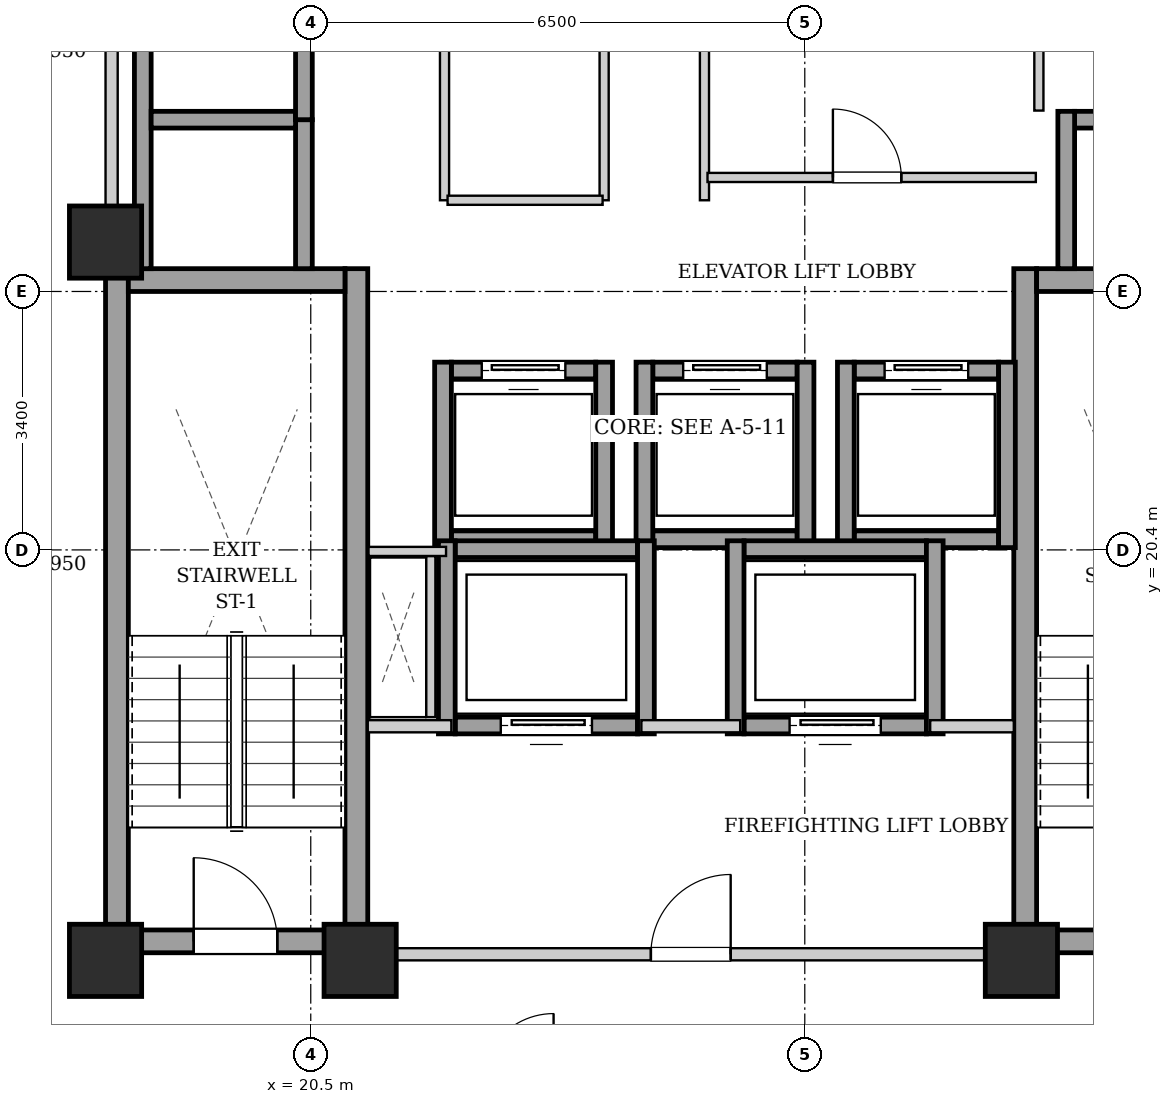
"""IFC4 building model, lengths in metres.
Left out: names, types, materials, properties, quantities, classifications, styles, units other than length and angle.
Written with IfcOpenShell. Run it as: python <this file> out.ifc"""

import sys

from ifc_helpers import new_model, si_unit, direction, frame, frame_2d, origin, origin_2d, place, context, subcontext, project, spatial, rectangle, extrude, element, fill, save


model = new_model("IFC4")
c1 = context("Model", 3, precision=1e-05, world=origin(), true_north=direction((0.0, 1.0)))
c2 = subcontext(c1, "Body", "Model", "MODEL_VIEW")
j1 = project(units=[si_unit("LENGTHUNIT", "METRE"), si_unit("PLANEANGLEUNIT", "RADIAN")], contexts=[c1])
p1 = place(None, origin())
s1 = spatial("IfcSite", under=j1, at=p1, CompositionType="ELEMENT")
p2 = place(p1, origin())
s2 = spatial("IfcBuilding", under=s1, at=p2, CompositionType="ELEMENT")
p3 = place(p2, frame((0.0, 0.0, 163.4)))
s3 = spatial("IfcBuildingStorey", under=s2, at=p3, CompositionType="ELEMENT", Elevation=163.4)
for number, where, z_axis, x_axis in (
    (1, (17.8, 15.0, 0.0), (0.0, 0.0, 1.0), (1.0, 0.0, 0.0)),
    (2, (21.15, 15.0, 0.0), (0.0, 0.0, 1.0), (1.0, 0.0, 0.0)),
    (3, (29.85, 15.0, 0.0), (0.0, 0.0, 1.0), (1.0, 0.0, 0.0)),
    (4, (17.8, 24.45, 0.0), (0.0, 0.0, 1.0), (1.0, 0.0, 0.0)),
):
    element("IfcColumn", number, at=place(p3, frame(where, z_axis=z_axis, x_axis=x_axis)), inside=s3, PredefinedType="COLUMN", context=c2, shape_type="SweptSolid", body=[
        extrude(rectangle(XDim=0.95, YDim=0.95, at=origin_2d()), origin(), (0.0, 0.0, 1.0), 3.25),
    ])
for number, where, z_axis, x_axis in (
    (5, (17.95, 15.1, 0.0), (0.0, 0.0, 1.0), (0.0, 1.0, 0.0)),
    (6, (21.1, 15.1, 0.0), (0.0, 0.0, 1.0), (0.0, 1.0, 0.0)),
):
    element("IfcWall", number, at=place(p3, frame(where, z_axis=z_axis, x_axis=x_axis)), inside=s3, PredefinedType="SHEAR", context=c2, shape_type="SweptSolid", body=[
        extrude(rectangle(XDim=9.0, YDim=0.3, at=frame_2d((4.5, 0.0))), origin(), (0.0, 0.0, 1.0), 2.99),
    ])
p4 = place(p3, frame((18.1, 23.95, 0.0), z_axis=(0.0, 0.0, 1.0), x_axis=(1.0, 0.0, 0.0)))
e7 = element("IfcWall", 7, at=p4, inside=s3, PredefinedType="SHEAR", context=c2, shape_type="SweptSolid", body=[
    extrude(rectangle(XDim=2.85, YDim=0.3, at=frame_2d((1.425, 0.0))), origin(), (0.0, 0.0, 1.0), 2.99),
])
p5 = place(p3, frame((18.1, 15.25, 0.0), z_axis=(0.0, 0.0, 1.0), x_axis=(1.0, 0.0, 0.0)))
e8 = element("IfcWall", 8, at=p5, inside=s3, PredefinedType="SHEAR", context=c2, shape_type="SweptSolid", body=[
    extrude(rectangle(XDim=2.85, YDim=0.3, at=frame_2d((1.425, 0.0))), origin(), (0.0, 0.0, 1.0), 2.99),
])
p6 = place(p5, frame((0.86, 0.0, 0.0)))
e9 = element("IfcOpeningElement", 9, at=p6, cuts=e8, PredefinedType="OPENING", context=c2, shape_type="SweptSolid", body=[
    extrude(rectangle(XDim=1.1, YDim=2.05, at=frame_2d((0.55, 1.025))), frame((0.0, 0.16, 0.0), z_axis=(0.0, -1.0, 0.0), x_axis=(1.0, 0.0, 0.0)), (0.0, 0.0, 1.0), 0.32),
])
p7 = place(p3, frame((29.9, 15.1, 0.0), z_axis=(0.0, 0.0, 1.0), x_axis=(0.0, 1.0, 0.0)))
e10 = element("IfcWall", 10, at=p7, inside=s3, PredefinedType="SHEAR", context=c2, shape_type="SweptSolid", body=[
    extrude(rectangle(XDim=9.0, YDim=0.3, at=frame_2d((4.5, 0.0))), origin(), (0.0, 0.0, 1.0), 2.99),
])
p8 = place(p3, frame((30.05, 23.95, 0.0), z_axis=(0.0, 0.0, 1.0), x_axis=(1.0, 0.0, 0.0)))
e11 = element("IfcWall", 11, at=p8, inside=s3, PredefinedType="SHEAR", context=c2, shape_type="SweptSolid", body=[
    extrude(rectangle(XDim=2.85, YDim=0.3, at=frame_2d((1.425, 0.0))), origin(), (0.0, 0.0, 1.0), 2.99),
])
p9 = place(p3, frame((30.05, 15.25, 0.0), z_axis=(0.0, 0.0, 1.0), x_axis=(1.0, 0.0, 0.0)))
e12 = element("IfcWall", 12, at=p9, inside=s3, PredefinedType="SHEAR", context=c2, shape_type="SweptSolid", body=[
    extrude(rectangle(XDim=2.85, YDim=0.3, at=frame_2d((1.425, 0.0))), origin(), (0.0, 0.0, 1.0), 2.99),
])
p10 = place(p9, frame((0.86, 0.0, 0.0)))
e13 = element("IfcOpeningElement", 13, at=p10, cuts=e12, PredefinedType="OPENING", context=c2, shape_type="SweptSolid", body=[
    extrude(rectangle(XDim=1.1, YDim=2.05, at=frame_2d((0.55, 1.025))), frame((0.0, 0.16, 0.0), z_axis=(0.0, -1.0, 0.0), x_axis=(1.0, 0.0, 0.0)), (0.0, 0.0, 1.0), 0.32),
])
p11 = place(p3, frame((22.35, 20.54, 0.0), z_axis=(0.0, 0.0, 1.0), x_axis=(1.0, 0.0, 0.0)))
e14 = element("IfcWall", 14, at=p11, inside=s3, PredefinedType="SHEAR", context=c2, shape_type="SweptSolid", body=[
    extrude(rectangle(XDim=1.9, YDim=0.22, at=frame_2d((0.95, 0.0))), origin(), (0.0, 0.0, 1.0), 2.99),
])
p12 = place(p3, frame((22.35, 22.76, 0.0), z_axis=(0.0, 0.0, 1.0), x_axis=(1.0, 0.0, 0.0)))
e15 = element("IfcWall", 15, at=p12, inside=s3, PredefinedType="SHEAR", context=c2, shape_type="SweptSolid", body=[
    extrude(rectangle(XDim=1.9, YDim=0.22, at=frame_2d((0.95, 0.0))), origin(), (0.0, 0.0, 1.0), 2.99),
])
p13 = place(p12, frame((0.4, 0.0, 0.0)))
e16 = element("IfcOpeningElement", 16, at=p13, cuts=e15, PredefinedType="OPENING", context=c2, shape_type="SweptSolid", body=[
    extrude(rectangle(XDim=1.1, YDim=2.15, at=frame_2d((0.55, 1.075))), frame((0.0, 0.12, 0.0), z_axis=(0.0, -1.0, 0.0), x_axis=(1.0, 0.0, 0.0)), (0.0, 0.0, 1.0), 0.24),
])
for number, where, z_axis, x_axis in (
    (17, (22.24, 20.43, 0.0), (0.0, 0.0, 1.0), (0.0, 1.0, 0.0)),
    (18, (24.36, 20.43, 0.0), (0.0, 0.0, 1.0), (0.0, 1.0, 0.0)),
):
    element("IfcWall", number, at=place(p3, frame(where, z_axis=z_axis, x_axis=x_axis)), inside=s3, PredefinedType="SHEAR", context=c2, shape_type="SweptSolid", body=[
        extrude(rectangle(XDim=2.44, YDim=0.22, at=frame_2d((1.22, 0.0))), origin(), (0.0, 0.0, 1.0), 2.99),
    ])
p14 = place(p3, frame((25.0, 20.54, 0.0), z_axis=(0.0, 0.0, 1.0), x_axis=(1.0, 0.0, 0.0)))
e19 = element("IfcWall", 19, at=p14, inside=s3, PredefinedType="SHEAR", context=c2, shape_type="SweptSolid", body=[
    extrude(rectangle(XDim=1.9, YDim=0.22, at=frame_2d((0.95, 0.0))), origin(), (0.0, 0.0, 1.0), 2.99),
])
p15 = place(p3, frame((25.0, 22.76, 0.0), z_axis=(0.0, 0.0, 1.0), x_axis=(1.0, 0.0, 0.0)))
e20 = element("IfcWall", 20, at=p15, inside=s3, PredefinedType="SHEAR", context=c2, shape_type="SweptSolid", body=[
    extrude(rectangle(XDim=1.9, YDim=0.22, at=frame_2d((0.95, 0.0))), origin(), (0.0, 0.0, 1.0), 2.99),
])
p16 = place(p15, frame((0.4, 0.0, 0.0)))
e21 = element("IfcOpeningElement", 21, at=p16, cuts=e20, PredefinedType="OPENING", context=c2, shape_type="SweptSolid", body=[
    extrude(rectangle(XDim=1.1, YDim=2.15, at=frame_2d((0.55, 1.075))), frame((0.0, 0.12, 0.0), z_axis=(0.0, -1.0, 0.0), x_axis=(1.0, 0.0, 0.0)), (0.0, 0.0, 1.0), 0.24),
])
for number, where, z_axis, x_axis in (
    (22, (24.89, 20.43, 0.0), (0.0, 0.0, 1.0), (0.0, 1.0, 0.0)),
    (23, (27.01, 20.43, 0.0), (0.0, 0.0, 1.0), (0.0, 1.0, 0.0)),
):
    element("IfcWall", number, at=place(p3, frame(where, z_axis=z_axis, x_axis=x_axis)), inside=s3, PredefinedType="SHEAR", context=c2, shape_type="SweptSolid", body=[
        extrude(rectangle(XDim=2.44, YDim=0.22, at=frame_2d((1.22, 0.0))), origin(), (0.0, 0.0, 1.0), 2.99),
    ])
p17 = place(p3, frame((27.65, 20.54, 0.0), z_axis=(0.0, 0.0, 1.0), x_axis=(1.0, 0.0, 0.0)))
e24 = element("IfcWall", 24, at=p17, inside=s3, PredefinedType="SHEAR", context=c2, shape_type="SweptSolid", body=[
    extrude(rectangle(XDim=1.9, YDim=0.22, at=frame_2d((0.95, 0.0))), origin(), (0.0, 0.0, 1.0), 2.99),
])
p18 = place(p3, frame((27.65, 22.76, 0.0), z_axis=(0.0, 0.0, 1.0), x_axis=(1.0, 0.0, 0.0)))
e25 = element("IfcWall", 25, at=p18, inside=s3, PredefinedType="SHEAR", context=c2, shape_type="SweptSolid", body=[
    extrude(rectangle(XDim=1.9, YDim=0.22, at=frame_2d((0.95, 0.0))), origin(), (0.0, 0.0, 1.0), 2.99),
])
p19 = place(p18, frame((0.4, 0.0, 0.0)))
e26 = element("IfcOpeningElement", 26, at=p19, cuts=e25, PredefinedType="OPENING", context=c2, shape_type="SweptSolid", body=[
    extrude(rectangle(XDim=1.1, YDim=2.15, at=frame_2d((0.55, 1.075))), frame((0.0, 0.12, 0.0), z_axis=(0.0, -1.0, 0.0), x_axis=(1.0, 0.0, 0.0)), (0.0, 0.0, 1.0), 0.24),
])
for number, where, z_axis, x_axis in (
    (27, (27.54, 20.43, 0.0), (0.0, 0.0, 1.0), (0.0, 1.0, 0.0)),
    (28, (29.66, 20.43, 0.0), (0.0, 0.0, 1.0), (0.0, 1.0, 0.0)),
):
    element("IfcWall", number, at=place(p3, frame(where, z_axis=z_axis, x_axis=x_axis)), inside=s3, PredefinedType="SHEAR", context=c2, shape_type="SweptSolid", body=[
        extrude(rectangle(XDim=2.44, YDim=0.22, at=frame_2d((1.22, 0.0))), origin(), (0.0, 0.0, 1.0), 2.99),
    ])
p20 = place(p3, frame((18.29, 24.1, 0.0), z_axis=(0.0, 0.0, 1.0), x_axis=(0.0, 1.0, 0.0)))
e29 = element("IfcWall", 29, at=p20, inside=s3, PredefinedType="SHEAR", context=c2, shape_type="SweptSolid", body=[
    extrude(rectangle(XDim=4.14, YDim=0.22, at=frame_2d((2.07, 0.0))), origin(), (0.0, 0.0, 1.0), 2.99),
])
p21 = place(p3, frame((20.41, 24.1, 0.0), z_axis=(0.0, 0.0, 1.0), x_axis=(0.0, 1.0, 0.0)))
e30 = element("IfcWall", 30, at=p21, inside=s3, PredefinedType="SHEAR", context=c2, shape_type="SweptSolid", body=[
    extrude(rectangle(XDim=1.96, YDim=0.22, at=frame_2d((0.98, 0.0))), origin(), (0.0, 0.0, 1.0), 2.99),
])
p22 = place(p3, frame((18.4, 26.06, 0.0), z_axis=(0.0, 0.0, 1.0), x_axis=(1.0, 0.0, 0.0)))
e31 = element("IfcWall", 31, at=p22, inside=s3, PredefinedType="SHEAR", context=c2, shape_type="SweptSolid", body=[
    extrude(rectangle(XDim=1.9, YDim=0.22, at=frame_2d((0.95, 0.0))), origin(), (0.0, 0.0, 1.0), 2.99),
])
p23 = place(p3, frame((20.41, 26.06, 0.0), z_axis=(0.0, 0.0, 1.0), x_axis=(0.0, 1.0, 0.0)))
e32 = element("IfcWall", 32, at=p23, inside=s3, PredefinedType="SHEAR", context=c2, shape_type="SweptSolid", body=[
    extrude(rectangle(XDim=2.18, YDim=0.22, at=frame_2d((1.09, 0.0))), origin(), (0.0, 0.0, 1.0), 2.99),
])
p24 = place(p3, frame((30.55, 26.06, 0.0), z_axis=(0.0, 0.0, 1.0), x_axis=(1.0, 0.0, 0.0)))
e33 = element("IfcWall", 33, at=p24, inside=s3, PredefinedType="SHEAR", context=c2, shape_type="SweptSolid", body=[
    extrude(rectangle(XDim=1.9, YDim=0.22, at=frame_2d((0.95, 0.0))), origin(), (0.0, 0.0, 1.0), 2.99),
])
p25 = place(p3, frame((30.44, 24.1, 0.0), z_axis=(0.0, 0.0, 1.0), x_axis=(0.0, 1.0, 0.0)))
e34 = element("IfcWall", 34, at=p25, inside=s3, PredefinedType="SHEAR", context=c2, shape_type="SweptSolid", body=[
    extrude(rectangle(XDim=2.07, YDim=0.22, at=frame_2d((1.035, 0.0))), origin(), (0.0, 0.0, 1.0), 2.99),
])
p26 = place(p3, frame((22.4, 18.09, 0.0), z_axis=(0.0, 0.0, 1.0), x_axis=(1.0, 0.0, 0.0)))
e35 = element("IfcWall", 35, at=p26, inside=s3, PredefinedType="SHEAR", context=c2, shape_type="SweptSolid", body=[
    extrude(rectangle(XDim=2.4, YDim=0.22, at=frame_2d((1.2, 0.0))), origin(), (0.0, 0.0, 1.0), 2.99),
])
p27 = place(p26, frame((0.6, 0.0, 0.0)))
e36 = element("IfcOpeningElement", 36, at=p27, cuts=e35, PredefinedType="OPENING", context=c2, shape_type="SweptSolid", body=[
    extrude(rectangle(XDim=1.2, YDim=2.15, at=frame_2d((0.6, 1.075))), frame((0.0, 0.12, 0.0), z_axis=(0.0, -1.0, 0.0), x_axis=(1.0, 0.0, 0.0)), (0.0, 0.0, 1.0), 0.24),
])
p28 = place(p3, frame((22.4, 20.41, 0.0), z_axis=(0.0, 0.0, 1.0), x_axis=(1.0, 0.0, 0.0)))
e37 = element("IfcWall", 37, at=p28, inside=s3, PredefinedType="SHEAR", context=c2, shape_type="SweptSolid", body=[
    extrude(rectangle(XDim=2.4, YDim=0.22, at=frame_2d((1.2, 0.0))), origin(), (0.0, 0.0, 1.0), 2.99),
])
for number, where, z_axis, x_axis in (
    (38, (22.29, 17.98, 0.0), (0.0, 0.0, 1.0), (0.0, 1.0, 0.0)),
    (39, (24.91, 17.98, 0.0), (0.0, 0.0, 1.0), (0.0, 1.0, 0.0)),
):
    element("IfcWall", number, at=place(p3, frame(where, z_axis=z_axis, x_axis=x_axis)), inside=s3, PredefinedType="SHEAR", context=c2, shape_type="SweptSolid", body=[
        extrude(rectangle(XDim=2.54, YDim=0.22, at=frame_2d((1.27, 0.0))), origin(), (0.0, 0.0, 1.0), 2.99),
    ])
p29 = place(p3, frame((26.2, 18.09, 0.0), z_axis=(0.0, 0.0, 1.0), x_axis=(1.0, 0.0, 0.0)))
e40 = element("IfcWall", 40, at=p29, inside=s3, PredefinedType="SHEAR", context=c2, shape_type="SweptSolid", body=[
    extrude(rectangle(XDim=2.4, YDim=0.22, at=frame_2d((1.2, 0.0))), origin(), (0.0, 0.0, 1.0), 2.99),
])
p30 = place(p29, frame((0.6, 0.0, 0.0)))
e41 = element("IfcOpeningElement", 41, at=p30, cuts=e40, PredefinedType="OPENING", context=c2, shape_type="SweptSolid", body=[
    extrude(rectangle(XDim=1.2, YDim=2.15, at=frame_2d((0.6, 1.075))), frame((0.0, 0.12, 0.0), z_axis=(0.0, -1.0, 0.0), x_axis=(1.0, 0.0, 0.0)), (0.0, 0.0, 1.0), 0.24),
])
p31 = place(p3, frame((26.2, 20.41, 0.0), z_axis=(0.0, 0.0, 1.0), x_axis=(1.0, 0.0, 0.0)))
e42 = element("IfcWall", 42, at=p31, inside=s3, PredefinedType="SHEAR", context=c2, shape_type="SweptSolid", body=[
    extrude(rectangle(XDim=2.4, YDim=0.22, at=frame_2d((1.2, 0.0))), origin(), (0.0, 0.0, 1.0), 2.99),
])
for number, where, z_axis, x_axis in (
    (43, (26.09, 17.98, 0.0), (0.0, 0.0, 1.0), (0.0, 1.0, 0.0)),
    (44, (28.71, 17.98, 0.0), (0.0, 0.0, 1.0), (0.0, 1.0, 0.0)),
):
    element("IfcWall", number, at=place(p3, frame(where, z_axis=z_axis, x_axis=x_axis)), inside=s3, PredefinedType="SHEAR", context=c2, shape_type="SweptSolid", body=[
        extrude(rectangle(XDim=2.54, YDim=0.22, at=frame_2d((1.27, 0.0))), origin(), (0.0, 0.0, 1.0), 2.99),
    ])
p32 = place(p3, frame((21.25, 15.08, 0.0), z_axis=(0.0, 0.0, 1.0), x_axis=(1.0, 0.0, 0.0)))
e45 = element("IfcWall", 45, at=p32, inside=s3, PredefinedType="PARTITIONING", context=c2, shape_type="SweptSolid", body=[
    extrude(rectangle(XDim=8.5, YDim=0.16, at=frame_2d((4.25, 0.0))), origin(), (0.0, 0.0, 1.0), 2.442),
])
p33 = place(p32, frame((3.725, 0.0, 0.0)))
e46 = element("IfcOpeningElement", 46, at=p33, cuts=e45, PredefinedType="OPENING", context=c2, shape_type="SweptSolid", body=[
    extrude(rectangle(XDim=1.05, YDim=2.05, at=frame_2d((0.525, 1.025))), frame((0.0, 0.09, 0.0), z_axis=(0.0, -1.0, 0.0), x_axis=(1.0, 0.0, 0.0)), (0.0, 0.0, 1.0), 0.18),
])
p34 = place(p3, frame((21.25, 18.08, 0.0), z_axis=(0.0, 0.0, 1.0), x_axis=(1.0, 0.0, 0.0)))
e47 = element("IfcWall", 47, at=p34, inside=s3, PredefinedType="PARTITIONING", context=c2, shape_type="SweptSolid", body=[
    extrude(rectangle(XDim=1.1, YDim=0.16, at=frame_2d((0.55, 0.0))), origin(), (0.0, 0.0, 1.0), 2.99),
])
p35 = place(p3, frame((24.85, 18.08, 0.0), z_axis=(0.0, 0.0, 1.0), x_axis=(1.0, 0.0, 0.0)))
e48 = element("IfcWall", 48, at=p35, inside=s3, PredefinedType="PARTITIONING", context=c2, shape_type="SweptSolid", body=[
    extrude(rectangle(XDim=1.3, YDim=0.16, at=frame_2d((0.65, 0.0))), origin(), (0.0, 0.0, 1.0), 2.99),
])
p36 = place(p3, frame((28.65, 18.08, 0.0), z_axis=(0.0, 0.0, 1.0), x_axis=(1.0, 0.0, 0.0)))
e49 = element("IfcWall", 49, at=p36, inside=s3, PredefinedType="PARTITIONING", context=c2, shape_type="SweptSolid", body=[
    extrude(rectangle(XDim=1.1, YDim=0.16, at=frame_2d((0.55, 0.0))), origin(), (0.0, 0.0, 1.0), 2.99),
])
p37 = place(p3, frame((17.88, 24.12, 0.0), z_axis=(0.0, 0.0, 1.0), x_axis=(0.0, 1.0, 0.0)))
e50 = element("IfcWall", 50, at=p37, inside=s3, PredefinedType="PARTITIONING", context=c2, shape_type="SweptSolid", body=[
    extrude(rectangle(XDim=4.76, YDim=0.16, at=frame_2d((2.38, 0.0))), origin(), (0.0, 0.0, 1.0), 2.99),
])
p38 = place(p3, frame((22.08, 18.2, 0.0), z_axis=(0.0, 0.0, 1.0), x_axis=(0.0, 1.0, 0.0)))
e51 = element("IfcWall", 51, at=p38, inside=s3, PredefinedType="PARTITIONING", context=c2, shape_type="SweptSolid", body=[
    extrude(rectangle(XDim=2.12, YDim=0.12, at=frame_2d((1.06, 0.0))), origin(), (0.0, 0.0, 1.0), 2.99),
])
p39 = place(p3, frame((22.28, 20.38, 0.0), z_axis=(0.0, 0.0, 1.0), x_axis=(-1.0, 0.0, 0.0)))
e52 = element("IfcWall", 52, at=p39, inside=s3, PredefinedType="PARTITIONING", context=c2, shape_type="SweptSolid", body=[
    extrude(rectangle(XDim=1.02, YDim=0.12, at=frame_2d((0.51, 0.0))), origin(), (0.0, 0.0, 1.0), 2.99),
])
for number, where, z_axis, x_axis in (
    (53, (24.36, 25.0, 0.0), (0.0, 0.0, 1.0), (0.0, 1.0, 0.0)),
    (54, (25.68, 25.0, 0.0), (0.0, 0.0, 1.0), (0.0, 1.0, 0.0)),
):
    element("IfcWall", number, at=place(p3, frame(where, z_axis=z_axis, x_axis=x_axis)), inside=s3, PredefinedType="PARTITIONING", context=c2, shape_type="SweptSolid", body=[
        extrude(rectangle(XDim=3.87, YDim=0.12, at=frame_2d((1.935, 0.0))), origin(), (0.0, 0.0, 1.0), 2.99),
    ])
p40 = place(p3, frame((30.08, 26.18, 0.0), z_axis=(0.0, 0.0, 1.0), x_axis=(0.0, 1.0, 0.0)))
e55 = element("IfcWall", 55, at=p40, inside=s3, PredefinedType="PARTITIONING", context=c2, shape_type="SweptSolid", body=[
    extrude(rectangle(XDim=2.68, YDim=0.12, at=frame_2d((1.34, 0.0))), origin(), (0.0, 0.0, 1.0), 2.99),
])
p41 = place(p3, frame((22.26, 25.0, 0.0), z_axis=(0.0, 0.0, 1.0), x_axis=(0.0, 1.0, 0.0)))
e56 = element("IfcWall", 56, at=p41, inside=s3, PredefinedType="PARTITIONING", context=c2, shape_type="SweptSolid", body=[
    extrude(rectangle(XDim=3.86, YDim=0.12, at=frame_2d((1.93, 0.0))), origin(), (0.0, 0.0, 1.0), 2.99),
])
p42 = place(p3, frame((22.3, 25.0, 0.0), z_axis=(0.0, 0.0, 1.0), x_axis=(1.0, 0.0, 0.0)))
e57 = element("IfcWall", 57, at=p42, inside=s3, PredefinedType="PARTITIONING", context=c2, shape_type="SweptSolid", body=[
    extrude(rectangle(XDim=2.04, YDim=0.12, at=frame_2d((1.02, 0.0))), origin(), (0.0, 0.0, 1.0), 2.99),
])
p43 = place(p3, frame((25.72, 25.3, 0.0), z_axis=(0.0, 0.0, 1.0), x_axis=(1.0, 0.0, 0.0)))
e58 = element("IfcWall", 58, at=p43, inside=s3, PredefinedType="PARTITIONING", context=c2, shape_type="SweptSolid", body=[
    extrude(rectangle(XDim=4.32, YDim=0.12, at=frame_2d((2.16, 0.0))), origin(), (0.0, 0.0, 1.0), 2.99),
])
p44 = place(p43, frame((1.65, 0.0, 0.0)))
e59 = element("IfcOpeningElement", 59, at=p44, cuts=e58, PredefinedType="OPENING", context=c2, shape_type="SweptSolid", body=[
    extrude(rectangle(XDim=0.9, YDim=2.05, at=frame_2d((0.45, 1.025))), frame((0.0, 0.07, 0.0), z_axis=(0.0, -1.0, 0.0), x_axis=(1.0, 0.0, 0.0)), (0.0, 0.0, 1.0), 0.14),
])
p45 = place(p6, origin())
e60 = element("IfcDoor", 60, at=p45, inside=s3, OperationType="SINGLE_SWING_LEFT", PredefinedType="DOOR", context=c2, shape_type="SweptSolid", body=[
    extrude(rectangle(XDim=1.1, YDim=2.05, at=frame_2d((0.55, 1.025))), frame((0.0, 0.025, 0.0), z_axis=(0.0, -1.0, 0.0), x_axis=(1.0, 0.0, 0.0)), (0.0, 0.0, 1.0), 0.05),
])
fill(e9, e60)
p46 = place(p13, origin())
e61 = element("IfcDoor", 61, at=p46, inside=s3, OperationType="SLIDING_TO_LEFT", PredefinedType="DOOR", context=c2, shape_type="SweptSolid", body=[
    extrude(rectangle(XDim=1.1, YDim=2.15, at=frame_2d((0.55, 1.075))), frame((0.0, 0.025, 0.0), z_axis=(0.0, -1.0, 0.0), x_axis=(1.0, 0.0, 0.0)), (0.0, 0.0, 1.0), 0.05),
])
fill(e16, e61)
p47 = place(p16, origin())
e62 = element("IfcDoor", 62, at=p47, inside=s3, OperationType="SLIDING_TO_LEFT", PredefinedType="DOOR", context=c2, shape_type="SweptSolid", body=[
    extrude(rectangle(XDim=1.1, YDim=2.15, at=frame_2d((0.55, 1.075))), frame((0.0, 0.025, 0.0), z_axis=(0.0, -1.0, 0.0), x_axis=(1.0, 0.0, 0.0)), (0.0, 0.0, 1.0), 0.05),
])
fill(e21, e62)
p48 = place(p19, origin())
e63 = element("IfcDoor", 63, at=p48, inside=s3, OperationType="SLIDING_TO_LEFT", PredefinedType="DOOR", context=c2, shape_type="SweptSolid", body=[
    extrude(rectangle(XDim=1.1, YDim=2.15, at=frame_2d((0.55, 1.075))), frame((0.0, 0.025, 0.0), z_axis=(0.0, -1.0, 0.0), x_axis=(1.0, 0.0, 0.0)), (0.0, 0.0, 1.0), 0.05),
])
fill(e26, e63)
p49 = place(p27, origin())
e64 = element("IfcDoor", 64, at=p49, inside=s3, OperationType="SLIDING_TO_LEFT", PredefinedType="DOOR", context=c2, shape_type="SweptSolid", body=[
    extrude(rectangle(XDim=1.2, YDim=2.15, at=frame_2d((0.6, 1.075))), frame((0.0, 0.025, 0.0), z_axis=(0.0, -1.0, 0.0), x_axis=(1.0, 0.0, 0.0)), (0.0, 0.0, 1.0), 0.05),
])
fill(e36, e64)
p50 = place(p30, origin())
e65 = element("IfcDoor", 65, at=p50, inside=s3, OperationType="SLIDING_TO_LEFT", PredefinedType="DOOR", context=c2, shape_type="SweptSolid", body=[
    extrude(rectangle(XDim=1.2, YDim=2.15, at=frame_2d((0.6, 1.075))), frame((0.0, 0.025, 0.0), z_axis=(0.0, -1.0, 0.0), x_axis=(1.0, 0.0, 0.0)), (0.0, 0.0, 1.0), 0.05),
])
fill(e41, e65)
p51 = place(p33, origin())
e66 = element("IfcDoor", 66, at=p51, inside=s3, OperationType="SINGLE_SWING_RIGHT", PredefinedType="DOOR", context=c2, shape_type="SweptSolid", body=[
    extrude(rectangle(XDim=1.05, YDim=2.05, at=frame_2d((0.525, 1.025))), frame((0.0, 0.025, 0.0), z_axis=(0.0, -1.0, 0.0), x_axis=(1.0, 0.0, 0.0)), (0.0, 0.0, 1.0), 0.05),
])
fill(e46, e66)
p52 = place(p44, origin())
e67 = element("IfcDoor", 67, at=p52, inside=s3, OperationType="SINGLE_SWING_LEFT", PredefinedType="DOOR", context=c2, shape_type="SweptSolid", body=[
    extrude(rectangle(XDim=0.9, YDim=2.05, at=frame_2d((0.45, 1.025))), frame((0.0, 0.025, 0.0), z_axis=(0.0, -1.0, 0.0), x_axis=(1.0, 0.0, 0.0)), (0.0, 0.0, 1.0), 0.05),
])
fill(e59, e67)
save(model, sys.argv[1])
